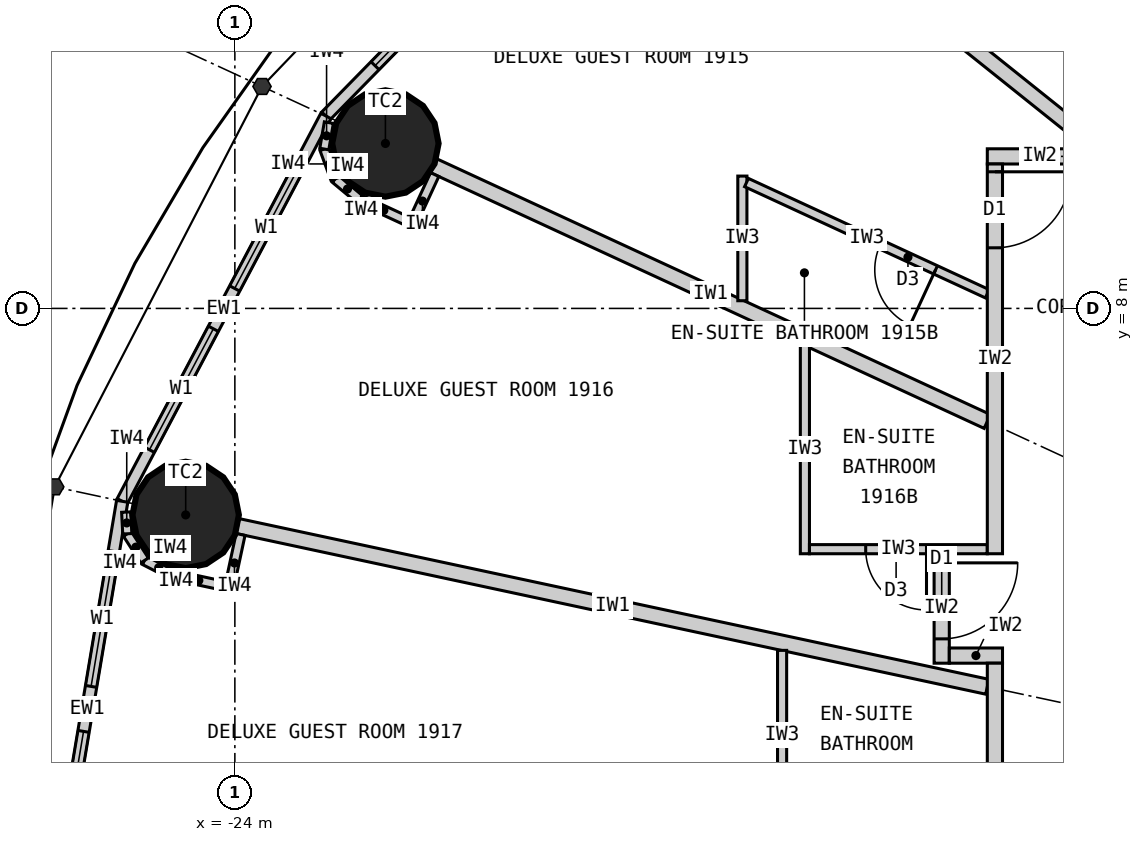
"""IFC4 building model, lengths in metres.
Left out: names, types, materials, properties, quantities, classifications, styles, units other than length and angle.
Written with IfcOpenShell. Run it as: python <this file> out.ifc"""

import sys

from ifc_helpers import new_model, si_unit, direction, frame, frame_2d, origin, origin_2d, place, context, subcontext, project, spatial, rectangle, circle, extrude, element, fill, save


model = new_model("IFC4")
c1 = context("Model", 3, precision=1e-05, world=origin(), true_north=direction((0.0, 1.0)))
c2 = subcontext(c1, "Body", "Model", "MODEL_VIEW")
j1 = project(units=[si_unit("LENGTHUNIT", "METRE"), si_unit("PLANEANGLEUNIT", "RADIAN")], contexts=[c1])
p1 = place(None, origin())
s1 = spatial("IfcSite", under=j1, at=p1, CompositionType="ELEMENT")
p2 = place(p1, origin())
s2 = spatial("IfcBuilding", under=s1, at=p2, CompositionType="ELEMENT")
p3 = place(p2, frame((0.0, 0.0, 77.1)))
s3 = spatial("IfcBuildingStorey", under=s2, at=p3, CompositionType="ELEMENT", Elevation=77.1)
for number, where, z_axis, x_axis in (
    (1, (-22.019, 10.17, 0.0), (0.0, 0.0, 1.0), (1.0, 0.0, 0.0)),
    (2, (-24.647, 5.283, 0.0), (0.0, 0.0, 1.0), (1.0, 0.0, 0.0)),
):
    element("IfcColumn", number, at=place(p3, frame(where, z_axis=z_axis, x_axis=x_axis)), inside=s3, PredefinedType="COLUMN", context=c2, shape_type="SweptSolid", body=[
        extrude(circle(Radius=0.7, at=origin_2d()), origin(), (0.0, 0.0, 1.0), 3.3),
    ])
p4 = place(p3, frame((-18.57, 14.856, 0.0), z_axis=(0.0, 0.0, 1.0), x_axis=(-0.699602905915, -0.714531856557, 0.0)))
e3 = element("IfcWall", 3, at=p4, inside=s3, PredefinedType="ELEMENTEDWALL", context=c2, shape_type="SweptSolid", body=[
    extrude(rectangle(XDim=6.051, YDim=0.15, at=frame_2d((3.025, 0.0))), origin(), (0.0, 0.0, 1.0), 3.12),
])
p5 = place(p4, frame((0.926, 0.0, 0.9)))
e4 = element("IfcOpeningElement", 4, at=p5, cuts=e3, PredefinedType="OPENING", context=c2, shape_type="SweptSolid", body=[
    extrude(rectangle(XDim=1.8, YDim=1.9, at=frame_2d((0.9, 0.95))), frame((0.0, 0.085, 0.0), z_axis=(0.0, -1.0, 0.0), x_axis=(1.0, 0.0, 0.0)), (0.0, 0.0, 1.0), 0.17),
])
p6 = place(p4, frame((3.325, 0.0, 0.9)))
e5 = element("IfcOpeningElement", 5, at=p6, cuts=e3, PredefinedType="OPENING", context=c2, shape_type="SweptSolid", body=[
    extrude(rectangle(XDim=1.8, YDim=1.9, at=frame_2d((0.9, 0.95))), frame((0.0, 0.085, 0.0), z_axis=(0.0, -1.0, 0.0), x_axis=(1.0, 0.0, 0.0)), (0.0, 0.0, 1.0), 0.17),
])
p7 = place(p3, frame((-22.803, 10.532, 0.0), z_axis=(0.0, 0.0, 1.0), x_axis=(-0.467296867008, -0.884100468321, 0.0)))
e6 = element("IfcWall", 6, at=p7, inside=s3, PredefinedType="ELEMENTEDWALL", context=c2, shape_type="SweptSolid", body=[
    extrude(rectangle(XDim=5.734, YDim=0.15, at=frame_2d((2.867, 0.0))), origin(), (0.0, 0.0, 1.0), 3.12),
])
p8 = place(p7, frame((0.767, 0.0, 0.9)))
e7 = element("IfcOpeningElement", 7, at=p8, cuts=e6, PredefinedType="OPENING", context=c2, shape_type="SweptSolid", body=[
    extrude(rectangle(XDim=1.8, YDim=1.9, at=frame_2d((0.9, 0.95))), frame((0.0, 0.085, 0.0), z_axis=(0.0, -1.0, 0.0), x_axis=(1.0, 0.0, 0.0)), (0.0, 0.0, 1.0), 0.17),
])
p9 = place(p7, frame((3.167, 0.0, 0.9)))
e8 = element("IfcOpeningElement", 8, at=p9, cuts=e6, PredefinedType="OPENING", context=c2, shape_type="SweptSolid", body=[
    extrude(rectangle(XDim=1.8, YDim=1.9, at=frame_2d((0.9, 0.95))), frame((0.0, 0.085, 0.0), z_axis=(0.0, -1.0, 0.0), x_axis=(1.0, 0.0, 0.0)), (0.0, 0.0, 1.0), 0.17),
])
p10 = place(p3, frame((-25.482, 5.462, 0.0), z_axis=(0.0, 0.0, 1.0), x_axis=(-0.165642551694, -0.986185857264, 0.0)))
e9 = element("IfcWall", 9, at=p10, inside=s3, PredefinedType="ELEMENTEDWALL", context=c2, shape_type="SweptSolid", body=[
    extrude(rectangle(XDim=5.539, YDim=0.15, at=frame_2d((2.77, 0.0))), origin(), (0.0, 0.0, 1.0), 3.12),
])
p11 = place(p10, frame((0.669, 0.0, 0.9)))
e10 = element("IfcOpeningElement", 10, at=p11, cuts=e9, PredefinedType="OPENING", context=c2, shape_type="SweptSolid", body=[
    extrude(rectangle(XDim=1.8, YDim=1.9, at=frame_2d((0.9, 0.95))), frame((0.0, 0.085, 0.0), z_axis=(0.0, -1.0, 0.0), x_axis=(1.0, 0.0, 0.0)), (0.0, 0.0, 1.0), 0.17),
])
p12 = place(p10, frame((3.07, 0.0, 0.9)))
e11 = element("IfcOpeningElement", 11, at=p12, cuts=e9, PredefinedType="OPENING", context=c2, shape_type="SweptSolid", body=[
    extrude(rectangle(XDim=1.8, YDim=1.9, at=frame_2d((0.9, 0.95))), frame((0.0, 0.085, 0.0), z_axis=(0.0, -1.0, 0.0), x_axis=(1.0, 0.0, 0.0)), (0.0, 0.0, 1.0), 0.17),
])
p13 = place(p3, frame((-12.625, 10.1, 0.0), z_axis=(0.0, 0.0, 1.0), x_axis=(-0.780892451574, 0.624665493744, 0.0)))
e12 = element("IfcWall", 12, at=p13, inside=s3, PredefinedType="PARTITIONING", context=c2, shape_type="SweptSolid", body=[
    extrude(rectangle(XDim=6.045, YDim=0.2, at=frame_2d((3.022, 0.0))), origin(), (0.0, 0.0, 1.0), 2.32),
])
p14 = place(p3, frame((-14.1, 6.512, 0.0), z_axis=(0.0, 0.0, 1.0), x_axis=(-0.907832871056, 0.419332181247, 0.0)))
e13 = element("IfcWall", 13, at=p14, inside=s3, PredefinedType="PARTITIONING", context=c2, shape_type="SweptSolid", body=[
    extrude(rectangle(XDim=8.023, YDim=0.2, at=frame_2d((4.011, 0.0))), origin(), (0.0, 0.0, 1.0), 2.32),
])
p15 = place(p3, frame((-14.1, 3.022, 0.0), z_axis=(0.0, 0.0, 1.0), x_axis=(-0.977790014929, 0.209586943072, 0.0)))
e14 = element("IfcWall", 14, at=p15, inside=s3, PredefinedType="PARTITIONING", context=c2, shape_type="SweptSolid", body=[
    extrude(rectangle(XDim=10.087, YDim=0.2, at=frame_2d((5.043, 0.0))), origin(), (0.0, 0.0, 1.0), 2.32),
])
p16 = place(p3, frame((-17.323, 8.101, 0.0), z_axis=(0.0, 0.0, 1.0), x_axis=(0.0, 1.0, 0.0)))
e15 = element("IfcWall", 15, at=p16, inside=s3, PredefinedType="PARTITIONING", context=c2, shape_type="SweptSolid", body=[
    extrude(rectangle(XDim=1.64, YDim=0.12, at=frame_2d((0.82, 0.0))), origin(), (0.0, 0.0, 1.0), 3.12),
])
p17 = place(p3, frame((-14.1, 8.193, 0.0), z_axis=(0.0, 0.0, 1.0), x_axis=(-0.907836493557, 0.419324338628, 0.0)))
e16 = element("IfcWall", 16, at=p17, inside=s3, PredefinedType="PARTITIONING", context=c2, shape_type="SweptSolid", body=[
    extrude(rectangle(XDim=3.49, YDim=0.12, at=frame_2d((1.745, 0.0))), origin(), (0.0, 0.0, 1.0), 3.12),
])
p18 = place(p17, frame((0.75, 0.0, 0.0)))
e17 = element("IfcOpeningElement", 17, at=p18, cuts=e16, PredefinedType="OPENING", context=c2, shape_type="SweptSolid", body=[
    extrude(rectangle(XDim=0.8, YDim=2.1, at=frame_2d((0.4, 1.05))), frame((0.0, 0.07, 0.0), z_axis=(0.0, -1.0, 0.0), x_axis=(1.0, 0.0, 0.0)), (0.0, 0.0, 1.0), 0.14),
])
p19 = place(p3, frame((-16.5, 7.521, 0.0), z_axis=(0.0, 0.0, 1.0), x_axis=(0.0, -1.0, 0.0)))
e18 = element("IfcWall", 18, at=p19, inside=s3, PredefinedType="PARTITIONING", context=c2, shape_type="SweptSolid", body=[
    extrude(rectangle(XDim=2.749, YDim=0.12, at=frame_2d((1.374, 0.0))), origin(), (0.0, 0.0, 1.0), 3.12),
])
p20 = place(p3, frame((-14.1, 4.833, 0.0), z_axis=(0.0, 0.0, 1.0), x_axis=(-1.0, 0.0, 0.0)))
e19 = element("IfcWall", 19, at=p20, inside=s3, PredefinedType="PARTITIONING", context=c2, shape_type="SweptSolid", body=[
    extrude(rectangle(XDim=2.34, YDim=0.12, at=frame_2d((1.17, 0.0))), origin(), (0.0, 0.0, 1.0), 3.12),
])
p21 = place(p20, frame((0.8, 0.0, 0.0)))
e20 = element("IfcOpeningElement", 20, at=p21, cuts=e19, PredefinedType="OPENING", context=c2, shape_type="SweptSolid", body=[
    extrude(rectangle(XDim=0.8, YDim=2.1, at=frame_2d((0.4, 1.05))), frame((0.0, 0.07, 0.0), z_axis=(0.0, -1.0, 0.0), x_axis=(1.0, 0.0, 0.0)), (0.0, 0.0, 1.0), 0.14),
])
p22 = place(p3, frame((-16.8, 3.501, 0.0), z_axis=(0.0, 0.0, 1.0), x_axis=(0.0, -1.0, 0.0)))
e21 = element("IfcWall", 21, at=p22, inside=s3, PredefinedType="PARTITIONING", context=c2, shape_type="SweptSolid", body=[
    extrude(rectangle(XDim=2.219, YDim=0.12, at=frame_2d((1.109, 0.0))), origin(), (0.0, 0.0, 1.0), 3.12),
])
p23 = place(p3, frame((-14.7, 4.772, 0.0), z_axis=(0.0, 0.0, 1.0), x_axis=(0.0, -1.0, 0.0)))
e22 = element("IfcWall", 22, at=p23, inside=s3, PredefinedType="PARTITIONING", context=c2, shape_type="SweptSolid", body=[
    extrude(rectangle(XDim=1.44, YDim=0.2, at=frame_2d((0.72, 0.0))), origin(), (0.0, 0.0, 1.0), 3.12),
])
p24 = place(p23, frame((0.12, 0.0, 0.0)))
e23 = element("IfcOpeningElement", 23, at=p24, cuts=e22, PredefinedType="OPENING", context=c2, shape_type="SweptSolid", body=[
    extrude(rectangle(XDim=1.0, YDim=2.2, at=frame_2d((0.5, 1.1))), frame((0.0, 0.11, 0.0), z_axis=(0.0, -1.0, 0.0), x_axis=(1.0, 0.0, 0.0)), (0.0, 0.0, 1.0), 0.22),
])
p25 = place(p3, frame((-13.9, 3.433, 0.0), z_axis=(0.0, 0.0, 1.0), x_axis=(-1.0, 0.0, 0.0)))
e24 = element("IfcWall", 24, at=p25, inside=s3, PredefinedType="PARTITIONING", context=c2, shape_type="SweptSolid", body=[
    extrude(rectangle(XDim=0.7, YDim=0.2, at=frame_2d((0.35, 0.0))), origin(), (0.0, 0.0, 1.0), 2.32),
])
p26 = place(p3, frame((-14.1, 10.0, 0.0), z_axis=(0.0, 0.0, 1.0), x_axis=(1.0, 0.0, 0.0)))
e25 = element("IfcWall", 25, at=p26, inside=s3, PredefinedType="PARTITIONING", context=c2, shape_type="SweptSolid", body=[
    extrude(rectangle(XDim=2.481, YDim=0.2, at=frame_2d((1.24, 0.0))), origin(), (0.0, 0.0, 1.0), 3.12),
])
p27 = place(p3, frame((-14.0, 9.9, 0.0), z_axis=(0.0, 0.0, 1.0), x_axis=(0.0, -1.0, 0.0)))
e26 = element("IfcWall", 26, at=p27, inside=s3, PredefinedType="PARTITIONING", context=c2, shape_type="SweptSolid", body=[
    extrude(rectangle(XDim=5.127, YDim=0.2, at=frame_2d((2.564, 0.0))), origin(), (0.0, 0.0, 1.0), 3.12),
])
p28 = place(p27, frame((0.103, 0.0, 0.0)))
e27 = element("IfcOpeningElement", 27, at=p28, cuts=e26, PredefinedType="OPENING", context=c2, shape_type="SweptSolid", body=[
    extrude(rectangle(XDim=1.0, YDim=2.2, at=frame_2d((0.5, 1.1))), frame((0.0, 0.11, 0.0), z_axis=(0.0, -1.0, 0.0), x_axis=(1.0, 0.0, 0.0)), (0.0, 0.0, 1.0), 0.22),
])
p29 = place(p3, frame((-14.0, 3.333, 0.0), z_axis=(0.0, 0.0, 1.0), x_axis=(0.0, -1.0, 0.0)))
e28 = element("IfcWall", 28, at=p29, inside=s3, PredefinedType="PARTITIONING", context=c2, shape_type="SweptSolid", body=[
    extrude(rectangle(XDim=6.665, YDim=0.2, at=frame_2d((3.333, 0.0))), origin(), (0.0, 0.0, 1.0), 3.12),
])
p30 = place(p29, frame((2.15, 0.0, 0.0)))
e29 = element("IfcOpeningElement", 29, at=p30, cuts=e28, PredefinedType="OPENING", context=c2, shape_type="SweptSolid", body=[
    extrude(rectangle(XDim=1.0, YDim=2.2, at=frame_2d((0.5, 1.1))), frame((0.0, 0.11, 0.0), z_axis=(0.0, -1.0, 0.0), x_axis=(1.0, 0.0, 0.0)), (0.0, 0.0, 1.0), 0.22),
])
p31 = place(p29, frame((5.173, 0.0, 0.0)))
e30 = element("IfcOpeningElement", 30, at=p31, cuts=e28, PredefinedType="OPENING", context=c2, shape_type="SweptSolid", body=[
    extrude(rectangle(XDim=1.0, YDim=2.2, at=frame_2d((0.5, 1.1))), frame((0.0, 0.11, 0.0), z_axis=(0.0, -1.0, 0.0), x_axis=(1.0, 0.0, 0.0)), (0.0, 0.0, 1.0), 0.22),
])
p32 = place(p3, frame((-21.371, 9.761, 0.0), z_axis=(0.0, 0.0, 1.0), x_axis=(-0.419259891039, -0.907866258744, 0.0)))
e31 = element("IfcWall", 31, at=p32, inside=s3, PredefinedType="PARTITIONING", context=c2, shape_type="SweptSolid", body=[
    extrude(rectangle(XDim=0.768, YDim=0.12, at=frame_2d((0.384, 0.0))), origin(), (0.0, 0.0, 1.0), 3.12),
])
p33 = place(p3, frame((-21.722, 9.144, 0.0), z_axis=(0.0, 0.0, 1.0), x_axis=(-0.907877701396, 0.419235112208, 0.0)))
e32 = element("IfcWall", 32, at=p33, inside=s3, PredefinedType="PARTITIONING", context=c2, shape_type="SweptSolid", body=[
    extrude(rectangle(XDim=0.7, YDim=0.12, at=frame_2d((0.35, 0.0))), origin(), (0.0, 0.0, 1.0), 3.12),
])
p34 = place(p3, frame((-22.358, 9.437, 0.0), z_axis=(0.0, 0.0, 1.0), x_axis=(-0.768412687942, 0.639954639806, 0.0)))
e33 = element("IfcWall", 33, at=p34, inside=s3, PredefinedType="PARTITIONING", context=c2, shape_type="SweptSolid", body=[
    extrude(rectangle(XDim=0.418, YDim=0.12, at=frame_2d((0.209, 0.0))), origin(), (0.0, 0.0, 1.0), 3.12),
])
p35 = place(p3, frame((-22.679, 9.705, 0.0), z_axis=(0.0, 0.0, 1.0), x_axis=(-0.345164001646, 0.938542386879, 0.0)))
e34 = element("IfcWall", 34, at=p35, inside=s3, PredefinedType="PARTITIONING", context=c2, shape_type="SweptSolid", body=[
    extrude(rectangle(XDim=0.418, YDim=0.12, at=frame_2d((0.209, 0.0))), origin(), (0.0, 0.0, 1.0), 3.12),
])
p36 = place(p3, frame((-22.823, 10.097, 0.0), z_axis=(0.0, 0.0, 1.0), x_axis=(0.169674995186, 0.985500074079, 0.0)))
e35 = element("IfcWall", 35, at=p36, inside=s3, PredefinedType="PARTITIONING", context=c2, shape_type="SweptSolid", body=[
    extrude(rectangle(XDim=0.353, YDim=0.12, at=frame_2d((0.176, 0.0))), origin(), (0.0, 0.0, 1.0), 3.12),
])
p37 = place(p3, frame((-23.925, 5.026, 0.0), z_axis=(0.0, 0.0, 1.0), x_axis=(-0.209681192172, -0.977769808109, 0.0)))
e36 = element("IfcWall", 36, at=p37, inside=s3, PredefinedType="PARTITIONING", context=c2, shape_type="SweptSolid", body=[
    extrude(rectangle(XDim=0.767, YDim=0.12, at=frame_2d((0.384, 0.0))), origin(), (0.0, 0.0, 1.0), 3.12),
])
p38 = place(p3, frame((-24.132, 4.347, 0.0), z_axis=(0.0, 0.0, 1.0), x_axis=(-0.977776882509, 0.209648200638, 0.0)))
e37 = element("IfcWall", 37, at=p38, inside=s3, PredefinedType="PARTITIONING", context=c2, shape_type="SweptSolid", body=[
    extrude(rectangle(XDim=0.7, YDim=0.12, at=frame_2d((0.35, 0.0))), origin(), (0.0, 0.0, 1.0), 3.12),
])
for number, where, z_axis, x_axis in (
    (38, (-24.816, 4.494, 0.0), (0.0, 0.0, 1.0), (-0.89, 0.455, 0.0)),
    (39, (-25.188, 4.684, 0.0), (0.0, 0.0, 1.0), (-0.543, 0.84, 0.0)),
):
    element("IfcWall", number, at=place(p3, frame(where, z_axis=z_axis, x_axis=x_axis)), inside=s3, PredefinedType="PARTITIONING", context=c2, shape_type="SweptSolid", body=[
        extrude(rectangle(XDim=0.418, YDim=0.12, at=frame_2d((0.209, 0.0))), origin(), (0.0, 0.0, 1.0), 3.12),
    ])
p39 = place(p3, frame((-25.416, 5.035, 0.0), z_axis=(0.0, 0.0, 1.0), x_axis=(-0.050406329159, 0.998728793007, 0.0)))
e40 = element("IfcWall", 40, at=p39, inside=s3, PredefinedType="PARTITIONING", context=c2, shape_type="SweptSolid", body=[
    extrude(rectangle(XDim=0.286, YDim=0.12, at=frame_2d((0.143, 0.0))), origin(), (0.0, 0.0, 1.0), 3.12),
])
p40 = place(p6, origin())
e41 = element("IfcWindow", 41, at=p40, inside=s3, PartitioningType="SINGLE_PANEL", PredefinedType="WINDOW", context=c2, shape_type="SweptSolid", body=[
    extrude(rectangle(XDim=1.8, YDim=1.9, at=frame_2d((0.9, 0.95))), frame((0.0, 0.03, 0.0), z_axis=(0.0, -1.0, 0.0), x_axis=(1.0, 0.0, 0.0)), (0.0, 0.0, 1.0), 0.06),
])
fill(e5, e41)
p41 = place(p8, origin())
e42 = element("IfcWindow", 42, at=p41, inside=s3, PartitioningType="SINGLE_PANEL", PredefinedType="WINDOW", context=c2, shape_type="SweptSolid", body=[
    extrude(rectangle(XDim=1.8, YDim=1.9, at=frame_2d((0.9, 0.95))), frame((0.0, 0.03, 0.0), z_axis=(0.0, -1.0, 0.0), x_axis=(1.0, 0.0, 0.0)), (0.0, 0.0, 1.0), 0.06),
])
fill(e7, e42)
p42 = place(p9, origin())
e43 = element("IfcWindow", 43, at=p42, inside=s3, PartitioningType="SINGLE_PANEL", PredefinedType="WINDOW", context=c2, shape_type="SweptSolid", body=[
    extrude(rectangle(XDim=1.8, YDim=1.9, at=frame_2d((0.9, 0.95))), frame((0.0, 0.03, 0.0), z_axis=(0.0, -1.0, 0.0), x_axis=(1.0, 0.0, 0.0)), (0.0, 0.0, 1.0), 0.06),
])
fill(e8, e43)
p43 = place(p11, origin())
e44 = element("IfcWindow", 44, at=p43, inside=s3, PartitioningType="SINGLE_PANEL", PredefinedType="WINDOW", context=c2, shape_type="SweptSolid", body=[
    extrude(rectangle(XDim=1.8, YDim=1.9, at=frame_2d((0.9, 0.95))), frame((0.0, 0.03, 0.0), z_axis=(0.0, -1.0, 0.0), x_axis=(1.0, 0.0, 0.0)), (0.0, 0.0, 1.0), 0.06),
])
fill(e10, e44)
p44 = place(p12, origin())
e45 = element("IfcWindow", 45, at=p44, inside=s3, PartitioningType="SINGLE_PANEL", PredefinedType="WINDOW", context=c2, shape_type="SweptSolid", body=[
    extrude(rectangle(XDim=1.8, YDim=1.9, at=frame_2d((0.9, 0.95))), frame((0.0, 0.03, 0.0), z_axis=(0.0, -1.0, 0.0), x_axis=(1.0, 0.0, 0.0)), (0.0, 0.0, 1.0), 0.06),
])
fill(e11, e45)
p45 = place(p18, origin())
e46 = element("IfcDoor", 46, at=p45, inside=s3, OperationType="SINGLE_SWING_LEFT", PredefinedType="DOOR", context=c2, shape_type="SweptSolid", body=[
    extrude(rectangle(XDim=0.8, YDim=2.1, at=frame_2d((0.4, 1.05))), frame((0.0, 0.025, 0.0), z_axis=(0.0, -1.0, 0.0), x_axis=(1.0, 0.0, 0.0)), (0.0, 0.0, 1.0), 0.05),
])
fill(e17, e46)
p46 = place(p28, origin())
e47 = element("IfcDoor", 47, at=p46, inside=s3, OperationType="SINGLE_SWING_LEFT", PredefinedType="DOOR", context=c2, shape_type="SweptSolid", body=[
    extrude(rectangle(XDim=1.0, YDim=2.2, at=frame_2d((0.5, 1.1))), frame((0.0, 0.025, 0.0), z_axis=(0.0, -1.0, 0.0), x_axis=(1.0, 0.0, 0.0)), (0.0, 0.0, 1.0), 0.05),
])
fill(e27, e47)
p47 = place(p21, origin())
e48 = element("IfcDoor", 48, at=p47, inside=s3, OperationType="SINGLE_SWING_LEFT", PredefinedType="DOOR", context=c2, shape_type="SweptSolid", body=[
    extrude(rectangle(XDim=0.8, YDim=2.1, at=frame_2d((0.4, 1.05))), frame((0.0, 0.025, 0.0), z_axis=(0.0, -1.0, 0.0), x_axis=(1.0, 0.0, 0.0)), (0.0, 0.0, 1.0), 0.05),
])
fill(e20, e48)
p48 = place(p24, origin())
e49 = element("IfcDoor", 49, at=p48, inside=s3, OperationType="SINGLE_SWING_LEFT", PredefinedType="DOOR", context=c2, shape_type="SweptSolid", body=[
    extrude(rectangle(XDim=1.0, YDim=2.2, at=frame_2d((0.5, 1.1))), frame((0.0, 0.025, 0.0), z_axis=(0.0, -1.0, 0.0), x_axis=(1.0, 0.0, 0.0)), (0.0, 0.0, 1.0), 0.05),
])
fill(e23, e49)
save(model, sys.argv[1])
